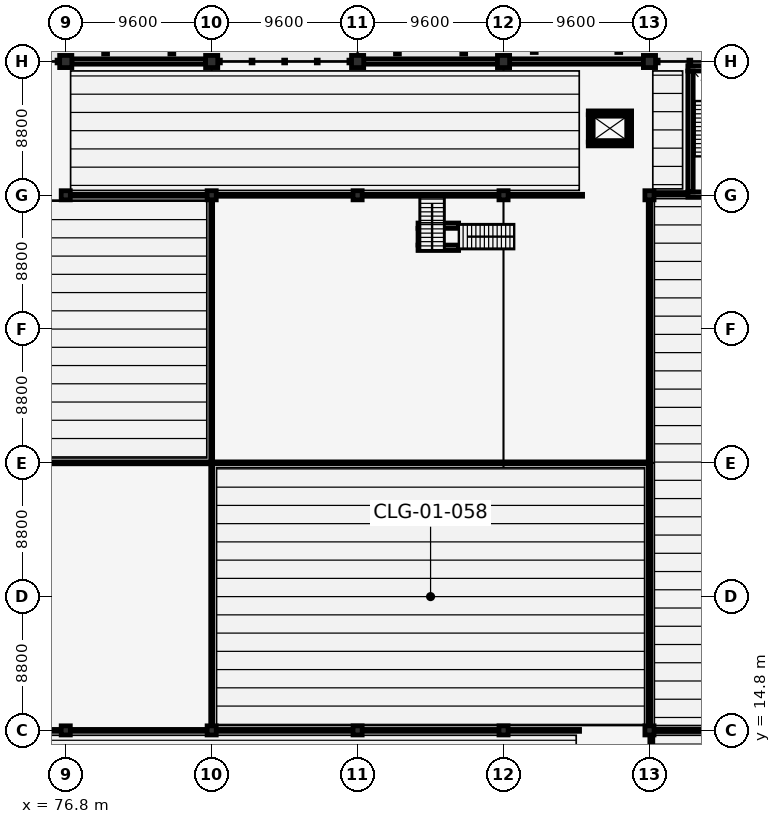
"""IFC4 building model, lengths in metres.
Left out: names, types, materials, properties, quantities, classifications, styles, units other than length and angle.
Written with IfcOpenShell. Run it as: python <this file> out.ifc"""

import sys

from ifc_helpers import new_model, si_unit, direction, frame, frame_2d, origin, origin_2d, place, context, subcontext, project, spatial, rectangle, hollow_rectangle, extrude, element, fill, save


model = new_model("IFC4")
c1 = context("Model", 3, precision=1e-05, world=origin(), true_north=direction((0.0, 1.0)))
c2 = subcontext(c1, "Body", "Model", "MODEL_VIEW")
j1 = project(units=[si_unit("LENGTHUNIT", "METRE"), si_unit("PLANEANGLEUNIT", "RADIAN")], contexts=[c1])
p1 = place(None, origin())
s1 = spatial("IfcSite", under=j1, at=p1, CompositionType="ELEMENT")
p2 = place(p1, origin())
s2 = spatial("IfcBuilding", under=s1, at=p2, CompositionType="ELEMENT")
p3 = place(p2, origin())
s3 = spatial("IfcBuildingStorey", under=s2, at=p3, CompositionType="ELEMENT", Elevation=0.0)
for number, where, z_axis, x_axis in (
    (1, (76.8, 14.8, 0.0), (0.0, 0.0, 1.0), (1.0, 0.0, 0.0)),
    (2, (76.8, 50.0, 0.0), (0.0, 0.0, 1.0), (1.0, 0.0, 0.0)),
):
    element("IfcColumn", number, at=place(p3, frame(where, z_axis=z_axis, x_axis=x_axis)), inside=s3, PredefinedType="COLUMN", context=c2, shape_type="SweptSolid", body=[
        extrude(rectangle(XDim=0.6, YDim=0.6, at=origin_2d()), origin(), (0.0, 0.0, 1.0), 4.8),
    ])
p4 = place(p3, frame((76.8, 58.8, 0.0), z_axis=(0.0, 0.0, 1.0), x_axis=(1.0, 0.0, 0.0)))
e3 = element("IfcColumn", 3, at=p4, inside=s3, PredefinedType="COLUMN", context=c2, shape_type="SweptSolid", body=[
    extrude(rectangle(XDim=0.8, YDim=0.8, at=origin_2d()), origin(), (0.0, 0.0, 1.0), 4.8),
])
for number, where, z_axis, x_axis in (
    (4, (86.4, 14.8, 0.0), (0.0, 0.0, 1.0), (1.0, 0.0, 0.0)),
    (5, (86.4, 50.0, 0.0), (0.0, 0.0, 1.0), (1.0, 0.0, 0.0)),
):
    element("IfcColumn", number, at=place(p3, frame(where, z_axis=z_axis, x_axis=x_axis)), inside=s3, PredefinedType="COLUMN", context=c2, shape_type="SweptSolid", body=[
        extrude(rectangle(XDim=0.6, YDim=0.6, at=origin_2d()), origin(), (0.0, 0.0, 1.0), 4.8),
    ])
p5 = place(p3, frame((86.4, 58.8, 0.0), z_axis=(0.0, 0.0, 1.0), x_axis=(1.0, 0.0, 0.0)))
e6 = element("IfcColumn", 6, at=p5, inside=s3, PredefinedType="COLUMN", context=c2, shape_type="SweptSolid", body=[
    extrude(rectangle(XDim=0.8, YDim=0.8, at=origin_2d()), origin(), (0.0, 0.0, 1.0), 4.8),
])
for number, where, z_axis, x_axis in (
    (7, (96.0, 14.8, 0.0), (0.0, 0.0, 1.0), (1.0, 0.0, 0.0)),
    (8, (96.0, 50.0, 0.0), (0.0, 0.0, 1.0), (1.0, 0.0, 0.0)),
):
    element("IfcColumn", number, at=place(p3, frame(where, z_axis=z_axis, x_axis=x_axis)), inside=s3, PredefinedType="COLUMN", context=c2, shape_type="SweptSolid", body=[
        extrude(rectangle(XDim=0.6, YDim=0.6, at=origin_2d()), origin(), (0.0, 0.0, 1.0), 4.8),
    ])
p6 = place(p3, frame((96.0, 58.8, 0.0), z_axis=(0.0, 0.0, 1.0), x_axis=(1.0, 0.0, 0.0)))
e9 = element("IfcColumn", 9, at=p6, inside=s3, PredefinedType="COLUMN", context=c2, shape_type="SweptSolid", body=[
    extrude(rectangle(XDim=0.8, YDim=0.8, at=origin_2d()), origin(), (0.0, 0.0, 1.0), 4.8),
])
for number, where, z_axis, x_axis in (
    (10, (105.6, 14.8, 0.0), (0.0, 0.0, 1.0), (1.0, 0.0, 0.0)),
    (11, (105.6, 50.0, 0.0), (0.0, 0.0, 1.0), (1.0, 0.0, 0.0)),
):
    element("IfcColumn", number, at=place(p3, frame(where, z_axis=z_axis, x_axis=x_axis)), inside=s3, PredefinedType="COLUMN", context=c2, shape_type="SweptSolid", body=[
        extrude(rectangle(XDim=0.6, YDim=0.6, at=origin_2d()), origin(), (0.0, 0.0, 1.0), 4.8),
    ])
p7 = place(p3, frame((105.6, 58.8, 0.0), z_axis=(0.0, 0.0, 1.0), x_axis=(1.0, 0.0, 0.0)))
e12 = element("IfcColumn", 12, at=p7, inside=s3, PredefinedType="COLUMN", context=c2, shape_type="SweptSolid", body=[
    extrude(rectangle(XDim=0.8, YDim=0.8, at=origin_2d()), origin(), (0.0, 0.0, 1.0), 4.8),
])
for number, where, z_axis, x_axis in (
    (13, (115.2, 14.8, 0.0), (0.0, 0.0, 1.0), (1.0, 0.0, 0.0)),
    (14, (115.2, 50.0, 0.0), (0.0, 0.0, 1.0), (1.0, 0.0, 0.0)),
):
    element("IfcColumn", number, at=place(p3, frame(where, z_axis=z_axis, x_axis=x_axis)), inside=s3, PredefinedType="COLUMN", context=c2, shape_type="SweptSolid", body=[
        extrude(rectangle(XDim=0.6, YDim=0.6, at=origin_2d()), origin(), (0.0, 0.0, 1.0), 4.8),
    ])
p8 = place(p3, frame((115.2, 58.8, 0.0), z_axis=(0.0, 0.0, 1.0), x_axis=(1.0, 0.0, 0.0)))
e15 = element("IfcColumn", 15, at=p8, inside=s3, PredefinedType="COLUMN", context=c2, shape_type="SweptSolid", body=[
    extrude(rectangle(XDim=0.8, YDim=0.8, at=origin_2d()), origin(), (0.0, 0.0, 1.0), 4.8),
])
p9 = place(p3, frame((77.2, 58.8, 0.0), z_axis=(0.0, 0.0, 1.0), x_axis=(1.0, 0.0, 0.0)))
e16 = element("IfcWall", 16, at=p9, inside=s3, PredefinedType="SOLIDWALL", context=c2, shape_type="SweptSolid", body=[
    extrude(rectangle(XDim=8.8, YDim=0.35, at=frame_2d((4.4, 0.0))), origin(), (0.0, 0.0, 1.0), 4.1),
])
p10 = place(p9, frame((1.4, 0.0, 0.0)))
e17 = element("IfcOpeningElement", 17, at=p10, cuts=e16, PredefinedType="OPENING", context=c2, shape_type="SweptSolid", body=[
    extrude(rectangle(XDim=1.96, YDim=2.37, at=frame_2d((0.98, 1.185))), frame((0.0, 0.185, 0.0), z_axis=(0.0, -1.0, 0.0), x_axis=(1.0, 0.0, 0.0)), (0.0, 0.0, 1.0), 0.37),
])
p11 = place(p9, frame((4.8, 0.0, 0.0)))
e18 = element("IfcOpeningElement", 18, at=p11, cuts=e16, PredefinedType="OPENING", context=c2, shape_type="SweptSolid", body=[
    extrude(rectangle(XDim=1.72, YDim=2.34, at=frame_2d((0.86, 1.17))), frame((0.0, 0.185, 0.0), z_axis=(0.0, -1.0, 0.0), x_axis=(1.0, 0.0, 0.0)), (0.0, 0.0, 1.0), 0.37),
])
p12 = place(p3, frame((96.4, 58.8, 0.0), z_axis=(0.0, 0.0, 1.0), x_axis=(1.0, 0.0, 0.0)))
e19 = element("IfcWall", 19, at=p12, inside=s3, PredefinedType="SOLIDWALL", context=c2, shape_type="SweptSolid", body=[
    extrude(rectangle(XDim=8.8, YDim=0.35, at=frame_2d((4.4, 0.0))), origin(), (0.0, 0.0, 1.0), 4.1),
])
p13 = place(p12, frame((1.4, 0.0, 0.0)))
e20 = element("IfcOpeningElement", 20, at=p13, cuts=e19, PredefinedType="OPENING", context=c2, shape_type="SweptSolid", body=[
    extrude(rectangle(XDim=1.96, YDim=2.37, at=frame_2d((0.98, 1.185))), frame((0.0, 0.185, 0.0), z_axis=(0.0, -1.0, 0.0), x_axis=(1.0, 0.0, 0.0)), (0.0, 0.0, 1.0), 0.37),
])
p14 = place(p12, frame((4.8, 0.0, 0.0)))
e21 = element("IfcOpeningElement", 21, at=p14, cuts=e19, PredefinedType="OPENING", context=c2, shape_type="SweptSolid", body=[
    extrude(rectangle(XDim=1.72, YDim=2.34, at=frame_2d((0.86, 1.17))), frame((0.0, 0.185, 0.0), z_axis=(0.0, -1.0, 0.0), x_axis=(1.0, 0.0, 0.0)), (0.0, 0.0, 1.0), 0.37),
])
p15 = place(p3, frame((106.0, 58.8, 0.0), z_axis=(0.0, 0.0, 1.0), x_axis=(1.0, 0.0, 0.0)))
e22 = element("IfcWall", 22, at=p15, inside=s3, PredefinedType="SOLIDWALL", context=c2, shape_type="SweptSolid", body=[
    extrude(rectangle(XDim=8.8, YDim=0.35, at=frame_2d((4.4, 0.0))), origin(), (0.0, 0.0, 1.0), 4.1),
])
p16 = place(p15, frame((1.4, 0.0, 0.0)))
e23 = element("IfcOpeningElement", 23, at=p16, cuts=e22, PredefinedType="OPENING", context=c2, shape_type="SweptSolid", body=[
    extrude(rectangle(XDim=1.88, YDim=2.31, at=frame_2d((0.94, 1.155))), frame((0.0, 0.185, 0.0), z_axis=(0.0, -1.0, 0.0), x_axis=(1.0, 0.0, 0.0)), (0.0, 0.0, 1.0), 0.37),
])
p17 = place(p15, frame((4.8, 0.0, 0.0)))
e24 = element("IfcOpeningElement", 24, at=p17, cuts=e22, PredefinedType="OPENING", context=c2, shape_type="SweptSolid", body=[
    extrude(rectangle(XDim=1.8, YDim=2.4, at=frame_2d((0.9, 1.2))), frame((0.0, 0.185, 0.0), z_axis=(0.0, -1.0, 0.0), x_axis=(1.0, 0.0, 0.0)), (0.0, 0.0, 1.0), 0.37),
])
for number, where, z_axis, x_axis in (
    (25, (79.42, 59.42, 0.0), (0.0, 0.0, 1.0), (1.0, 0.0, 0.0)),
    (26, (83.78, 59.42, 0.0), (0.0, 0.0, 1.0), (1.0, 0.0, 0.0)),
    (27, (98.62, 59.42, 0.0), (0.0, 0.0, 1.0), (1.0, 0.0, 0.0)),
    (28, (102.98, 59.42, 0.0), (0.0, 0.0, 1.0), (1.0, 0.0, 0.0)),
):
    element("IfcColumn", number, at=place(p3, frame(where, z_axis=z_axis, x_axis=x_axis)), inside=s3, PredefinedType="COLUMN", context=c2, shape_type="SweptSolid", body=[
        extrude(hollow_rectangle(XDim=0.254, YDim=0.254, WallThickness=0.012, at=origin_2d()), origin(), (0.0, 0.0, 1.0), 3.47),
    ])
for number, where, z_axis, x_axis in (
    (29, (107.62, 59.52, 0.0), (0.0, 0.0, 1.0), (1.0, 0.0, 0.0)),
    (30, (113.18, 59.52, 0.0), (0.0, 0.0, 1.0), (1.0, 0.0, 0.0)),
):
    element("IfcColumn", number, at=place(p3, frame(where, z_axis=z_axis, x_axis=x_axis)), inside=s3, PredefinedType="COLUMN", context=c2, shape_type="SweptSolid", body=[
        extrude(hollow_rectangle(XDim=0.254, YDim=0.254, WallThickness=0.012, at=origin_2d()), origin(), (0.0, 0.0, 1.0), 3.56),
    ])
for number, where, z_axis, x_axis in (
    (31, (123.375, 50.05, 0.0), (0.0, 0.0, 1.0), (-1.0, 0.0, 0.0)),
    (32, (117.725, 58.35, 0.0), (0.0, 0.0, 1.0), (1.0, 0.0, 0.0)),
):
    element("IfcWall", number, at=place(p3, frame(where, z_axis=z_axis, x_axis=x_axis)), inside=s3, PredefinedType="SHEAR", context=c2, shape_type="SweptSolid", body=[
        extrude(rectangle(XDim=5.65, YDim=0.35, at=frame_2d((2.825, 0.0))), origin(), (0.0, 0.0, 1.0), 4.55),
    ])
p18 = place(p3, frame((117.9, 50.225, 0.0), z_axis=(0.0, 0.0, 1.0), x_axis=(0.0, 1.0, 0.0)))
e33 = element("IfcWall", 33, at=p18, inside=s3, PredefinedType="SHEAR", context=c2, shape_type="SweptSolid", body=[
    extrude(rectangle(XDim=7.95, YDim=0.35, at=frame_2d((3.975, 0.0))), origin(), (0.0, 0.0, 1.0), 4.55),
])
p19 = place(p18, frame((0.22, 0.0, 0.0)))
e34 = element("IfcOpeningElement", 34, at=p19, cuts=e33, PredefinedType="OPENING", context=c2, shape_type="SweptSolid", body=[
    extrude(rectangle(XDim=2.05, YDim=2.15, at=frame_2d((1.025, 1.075))), frame((0.0, 0.185, 0.0), z_axis=(0.0, -1.0, 0.0), x_axis=(1.0, 0.0, 0.0)), (0.0, 0.0, 1.0), 0.37),
])
for number, where, z_axis, x_axis in (
    (35, (99.975, 46.55, 0.0), (0.0, 0.0, 1.0), (1.0, 0.0, 0.0)),
    (36, (99.975, 48.0, 0.0), (0.0, 0.0, 1.0), (1.0, 0.0, 0.0)),
):
    element("IfcWall", number, at=place(p3, frame(where, z_axis=z_axis, x_axis=x_axis)), inside=s3, PredefinedType="SHEAR", context=c2, shape_type="SweptSolid", body=[
        extrude(rectangle(XDim=2.67, YDim=0.35, at=frame_2d((1.335, 0.0))), origin(), (0.0, 0.0, 1.0), 2.205),
    ])
p20 = place(p3, frame((100.15, 46.725, 0.0), z_axis=(0.0, 0.0, 1.0), x_axis=(0.0, 1.0, 0.0)))
e37 = element("IfcWall", 37, at=p20, inside=s3, PredefinedType="SHEAR", context=c2, shape_type="SweptSolid", body=[
    extrude(rectangle(XDim=1.1, YDim=0.35, at=frame_2d((0.55, 0.0))), origin(), (0.0, 0.0, 1.0), 2.205),
])
p21 = place(p3, frame((114.025, 53.375, 0.0), z_axis=(0.0, 0.0, 1.0), x_axis=(-1.0, 0.0, 0.0)))
e38 = element("IfcWall", 38, at=p21, inside=s3, PredefinedType="SOLIDWALL", context=c2, shape_type="SweptSolid", body=[
    extrude(rectangle(XDim=2.85, YDim=0.25, at=frame_2d((1.425, 0.0))), origin(), (0.0, 0.0, 1.0), 4.55),
])
p22 = place(p21, frame((0.875, 0.0, 0.0)))
e39 = element("IfcOpeningElement", 39, at=p22, cuts=e38, PredefinedType="OPENING", context=c2, shape_type="SweptSolid", body=[
    extrude(rectangle(XDim=1.1, YDim=2.15, at=frame_2d((0.55, 1.075))), frame((0.0, 0.135, 0.0), z_axis=(0.0, -1.0, 0.0), x_axis=(1.0, 0.0, 0.0)), (0.0, 0.0, 1.0), 0.27),
])
p23 = place(p3, frame((111.175, 55.425, 0.0), z_axis=(0.0, 0.0, 1.0), x_axis=(1.0, 0.0, 0.0)))
e40 = element("IfcWall", 40, at=p23, inside=s3, PredefinedType="SOLIDWALL", context=c2, shape_type="SweptSolid", body=[
    extrude(rectangle(XDim=2.85, YDim=0.25, at=frame_2d((1.425, 0.0))), origin(), (0.0, 0.0, 1.0), 4.55),
])
for number, where, z_axis, x_axis in (
    (41, (111.3, 53.5, 0.0), (0.0, 0.0, 1.0), (0.0, 1.0, 0.0)),
    (42, (113.9, 55.3, 0.0), (0.0, 0.0, 1.0), (0.0, -1.0, 0.0)),
):
    element("IfcWall", number, at=place(p3, frame(where, z_axis=z_axis, x_axis=x_axis)), inside=s3, PredefinedType="SOLIDWALL", context=c2, shape_type="SweptSolid", body=[
        extrude(rectangle(XDim=1.8, YDim=0.25, at=frame_2d((0.9, 0.0))), origin(), (0.0, 0.0, 1.0), 4.55),
    ])
p24 = place(p3, frame((86.4, 14.9, 0.0), z_axis=(0.0, 0.0, 1.0), x_axis=(0.0, 1.0, 0.0)))
e43 = element("IfcWall", 43, at=p24, inside=s3, PredefinedType="PARTITIONING", context=c2, shape_type="SweptSolid", body=[
    extrude(rectangle(XDim=17.4, YDim=0.125, at=frame_2d((8.7, 0.0))), origin(), (0.0, 0.0, 1.0), 4.42),
])
p25 = place(p3, frame((57.7, 32.4, 0.0), z_axis=(0.0, 0.0, 1.0), x_axis=(1.0, 0.0, 0.0)))
e44 = element("IfcWall", 44, at=p25, inside=s3, PredefinedType="PARTITIONING", context=c2, shape_type="SweptSolid", body=[
    extrude(rectangle(XDim=28.6, YDim=0.125, at=frame_2d((14.3, 0.0))), origin(), (0.0, 0.0, 1.0), 4.42),
])
p26 = place(p3, frame((62.2, 14.8, 0.0), z_axis=(0.0, 0.0, 1.0), x_axis=(1.0, 0.0, 0.0)))
e45 = element("IfcWall", 45, at=p26, inside=s3, PredefinedType="PARTITIONING", context=c2, shape_type="SweptSolid", body=[
    extrude(rectangle(XDim=24.1, YDim=0.125, at=frame_2d((12.05, 0.0))), origin(), (0.0, 0.0, 1.0), 3.925),
])
p27 = place(p3, frame((86.5, 32.4, 0.0), z_axis=(0.0, 0.0, 1.0), x_axis=(1.0, 0.0, 0.0)))
e46 = element("IfcWall", 46, at=p27, inside=s3, PredefinedType="PARTITIONING", context=c2, shape_type="SweptSolid", body=[
    extrude(rectangle(XDim=28.65, YDim=0.125, at=frame_2d((14.325, 0.0))), origin(), (0.0, 0.0, 1.0), 4.42),
])
p28 = place(p3, frame((86.5, 14.8, 0.0), z_axis=(0.0, 0.0, 1.0), x_axis=(1.0, 0.0, 0.0)))
e47 = element("IfcWall", 47, at=p28, inside=s3, PredefinedType="PARTITIONING", context=c2, shape_type="SweptSolid", body=[
    extrude(rectangle(XDim=24.1, YDim=0.125, at=frame_2d((12.05, 0.0))), origin(), (0.0, 0.0, 1.0), 3.925),
])
p29 = place(p3, frame((115.2, 14.9, 0.0), z_axis=(0.0, 0.0, 1.0), x_axis=(0.0, 1.0, 0.0)))
e48 = element("IfcWall", 48, at=p29, inside=s3, PredefinedType="PARTITIONING", context=c2, shape_type="SweptSolid", body=[
    extrude(rectangle(XDim=17.4, YDim=0.16, at=frame_2d((8.7, 0.0))), origin(), (0.0, 0.0, 1.0), 4.42),
])
p30 = place(p29, frame((7.8, 0.0, 0.0)))
e49 = element("IfcOpeningElement", 49, at=p30, cuts=e48, PredefinedType="OPENING", context=c2, shape_type="SweptSolid", body=[
    extrude(rectangle(XDim=1.8, YDim=2.15, at=frame_2d((0.9, 1.075))), frame((0.0, 0.09, 0.0), z_axis=(0.0, -1.0, 0.0), x_axis=(1.0, 0.0, 0.0)), (0.0, 0.0, 1.0), 0.18),
])
p31 = place(p3, frame((86.4, 32.5, 0.0), z_axis=(0.0, 0.0, 1.0), x_axis=(0.0, 1.0, 0.0)))
e50 = element("IfcWall", 50, at=p31, inside=s3, PredefinedType="PARTITIONING", context=c2, shape_type="SweptSolid", body=[
    extrude(rectangle(XDim=17.45, YDim=0.125, at=frame_2d((8.725, 0.0))), origin(), (0.0, 0.0, 1.0), 4.42),
])
p32 = place(p3, frame((76.9, 50.0, 0.0), z_axis=(0.0, 0.0, 1.0), x_axis=(1.0, 0.0, 0.0)))
e51 = element("IfcWall", 51, at=p32, inside=s3, PredefinedType="PARTITIONING", context=c2, shape_type="SweptSolid", body=[
    extrude(rectangle(XDim=9.4, YDim=0.125, at=frame_2d((4.7, 0.0))), origin(), (0.0, 0.0, 1.0), 3.925),
])
p33 = place(p3, frame((86.5, 50.0, 0.0), z_axis=(0.0, 0.0, 1.0), x_axis=(1.0, 0.0, 0.0)))
e52 = element("IfcWall", 52, at=p33, inside=s3, PredefinedType="PARTITIONING", context=c2, shape_type="SweptSolid", body=[
    extrude(rectangle(XDim=24.3, YDim=0.125, at=frame_2d((12.15, 0.0))), origin(), (0.0, 0.0, 1.0), 3.925),
])
p34 = place(p3, frame((115.2, 32.5, 0.0), z_axis=(0.0, 0.0, 1.0), x_axis=(0.0, 1.0, 0.0)))
e53 = element("IfcWall", 53, at=p34, inside=s3, PredefinedType="PARTITIONING", context=c2, shape_type="SweptSolid", body=[
    extrude(rectangle(XDim=17.45, YDim=0.16, at=frame_2d((8.725, 0.0))), origin(), (0.0, 0.0, 1.0), 4.42),
])
p35 = place(p34, frame((7.825, 0.0, 0.0)))
e54 = element("IfcOpeningElement", 54, at=p35, cuts=e53, PredefinedType="OPENING", context=c2, shape_type="SweptSolid", body=[
    extrude(rectangle(XDim=1.8, YDim=2.15, at=frame_2d((0.9, 1.075))), frame((0.0, 0.09, 0.0), z_axis=(0.0, -1.0, 0.0), x_axis=(1.0, 0.0, 0.0)), (0.0, 0.0, 1.0), 0.18),
])
p36 = place(p3, frame((115.15, 50.1, 0.0), z_axis=(0.0, 0.0, 1.0), x_axis=(1.0, 0.0, 0.0)))
e55 = element("IfcWall", 55, at=p36, inside=s3, PredefinedType="PARTITIONING", context=c2, shape_type="SweptSolid", body=[
    extrude(rectangle(XDim=2.45, YDim=0.16, at=frame_2d((1.225, 0.0))), origin(), (0.0, 0.0, 1.0), 3.835),
])
p37 = place(p36, frame((0.43, 0.0, 0.0)))
e56 = element("IfcOpeningElement", 56, at=p37, cuts=e55, PredefinedType="OPENING", context=c2, shape_type="SweptSolid", body=[
    extrude(rectangle(XDim=1.8, YDim=2.15, at=frame_2d((0.9, 1.075))), frame((0.0, 0.09, 0.0), z_axis=(0.0, -1.0, 0.0), x_axis=(1.0, 0.0, 0.0)), (0.0, 0.0, 1.0), 0.18),
])
p38 = place(p3, frame((115.15, 14.8, 0.0), z_axis=(0.0, 0.0, 1.0), x_axis=(1.0, 0.0, 0.0)))
e57 = element("IfcWall", 57, at=p38, inside=s3, PredefinedType="PARTITIONING", context=c2, shape_type="SweptSolid", body=[
    extrude(rectangle(XDim=4.65, YDim=0.15, at=frame_2d((2.325, 0.0))), origin(), (0.0, 0.0, 1.0), 3.835),
])
p39 = place(p38, frame((1.85, 0.0, 0.0)))
e58 = element("IfcOpeningElement", 58, at=p39, cuts=e57, PredefinedType="OPENING", context=c2, shape_type="SweptSolid", body=[
    extrude(rectangle(XDim=0.95, YDim=2.15, at=frame_2d((0.475, 1.075))), frame((0.0, 0.085, 0.0), z_axis=(0.0, -1.0, 0.0), x_axis=(1.0, 0.0, 0.0)), (0.0, 0.0, 1.0), 0.17),
])
p40 = place(p3, frame((115.3, 10.84, 0.0), z_axis=(0.0, 0.0, 1.0), x_axis=(0.0, 1.0, 0.0)))
e59 = element("IfcWall", 59, at=p40, inside=s3, PredefinedType="PARTITIONING", context=c2, shape_type="SweptSolid", body=[
    extrude(rectangle(XDim=3.72, YDim=0.15, at=frame_2d((1.86, 0.0))), origin(), (0.0, 0.0, 1.0), 4.067),
])
p41 = place(p10, origin())
e60 = element("IfcDoor", 60, at=p41, inside=s3, OperationType="DOUBLE_DOOR_SINGLE_SWING", PredefinedType="DOOR", context=c2, shape_type="SweptSolid", body=[
    extrude(rectangle(XDim=1.96, YDim=2.37, at=frame_2d((0.98, 1.185))), frame((0.0, 0.025, 0.0), z_axis=(0.0, -1.0, 0.0), x_axis=(1.0, 0.0, 0.0)), (0.0, 0.0, 1.0), 0.05),
])
fill(e17, e60)
p42 = place(p11, origin())
e61 = element("IfcDoor", 61, at=p42, inside=s3, OperationType="DOUBLE_DOOR_SINGLE_SWING", PredefinedType="DOOR", context=c2, shape_type="SweptSolid", body=[
    extrude(rectangle(XDim=1.72, YDim=2.34, at=frame_2d((0.86, 1.17))), frame((0.0, 0.025, 0.0), z_axis=(0.0, -1.0, 0.0), x_axis=(1.0, 0.0, 0.0)), (0.0, 0.0, 1.0), 0.05),
])
fill(e18, e61)
p43 = place(p13, origin())
e62 = element("IfcDoor", 62, at=p43, inside=s3, OperationType="DOUBLE_DOOR_SINGLE_SWING", PredefinedType="DOOR", context=c2, shape_type="SweptSolid", body=[
    extrude(rectangle(XDim=1.96, YDim=2.37, at=frame_2d((0.98, 1.185))), frame((0.0, 0.025, 0.0), z_axis=(0.0, -1.0, 0.0), x_axis=(1.0, 0.0, 0.0)), (0.0, 0.0, 1.0), 0.05),
])
fill(e20, e62)
p44 = place(p14, origin())
e63 = element("IfcDoor", 63, at=p44, inside=s3, OperationType="DOUBLE_DOOR_SINGLE_SWING", PredefinedType="DOOR", context=c2, shape_type="SweptSolid", body=[
    extrude(rectangle(XDim=1.72, YDim=2.34, at=frame_2d((0.86, 1.17))), frame((0.0, 0.025, 0.0), z_axis=(0.0, -1.0, 0.0), x_axis=(1.0, 0.0, 0.0)), (0.0, 0.0, 1.0), 0.05),
])
fill(e21, e63)
p45 = place(p16, origin())
e64 = element("IfcDoor", 64, at=p45, inside=s3, OperationType="DOUBLE_DOOR_SINGLE_SWING", PredefinedType="DOOR", context=c2, shape_type="SweptSolid", body=[
    extrude(rectangle(XDim=1.88, YDim=2.31, at=frame_2d((0.94, 1.155))), frame((0.0, 0.025, 0.0), z_axis=(0.0, -1.0, 0.0), x_axis=(1.0, 0.0, 0.0)), (0.0, 0.0, 1.0), 0.05),
])
fill(e23, e64)
p46 = place(p17, origin())
e65 = element("IfcDoor", 65, at=p46, inside=s3, OperationType="DOUBLE_DOOR_SINGLE_SWING", PredefinedType="DOOR", context=c2, shape_type="SweptSolid", body=[
    extrude(rectangle(XDim=1.8, YDim=2.4, at=frame_2d((0.9, 1.2))), frame((0.0, 0.025, 0.0), z_axis=(0.0, -1.0, 0.0), x_axis=(1.0, 0.0, 0.0)), (0.0, 0.0, 1.0), 0.05),
])
fill(e24, e65)
p47 = place(p19, origin())
e66 = element("IfcDoor", 66, at=p47, inside=s3, OperationType="DOUBLE_DOOR_SINGLE_SWING", PredefinedType="DOOR", context=c2, shape_type="SweptSolid", body=[
    extrude(rectangle(XDim=2.05, YDim=2.15, at=frame_2d((1.025, 1.075))), frame((0.0, 0.025, 0.0), z_axis=(0.0, -1.0, 0.0), x_axis=(1.0, 0.0, 0.0)), (0.0, 0.0, 1.0), 0.05),
])
fill(e34, e66)
p48 = place(p22, origin())
e67 = element("IfcDoor", 67, at=p48, inside=s3, OperationType="DOUBLE_DOOR_SLIDING", PredefinedType="DOOR", context=c2, shape_type="SweptSolid", body=[
    extrude(rectangle(XDim=1.1, YDim=2.15, at=frame_2d((0.55, 1.075))), frame((0.0, 0.025, 0.0), z_axis=(0.0, -1.0, 0.0), x_axis=(1.0, 0.0, 0.0)), (0.0, 0.0, 1.0), 0.05),
])
fill(e39, e67)
p49 = place(p30, origin())
e68 = element("IfcDoor", 68, at=p49, inside=s3, OperationType="DOUBLE_DOOR_SINGLE_SWING", PredefinedType="DOOR", context=c2, shape_type="SweptSolid", body=[
    extrude(rectangle(XDim=1.8, YDim=2.15, at=frame_2d((0.9, 1.075))), frame((0.0, 0.025, 0.0), z_axis=(0.0, -1.0, 0.0), x_axis=(1.0, 0.0, 0.0)), (0.0, 0.0, 1.0), 0.05),
])
fill(e49, e68)
p50 = place(p35, origin())
e69 = element("IfcDoor", 69, at=p50, inside=s3, OperationType="DOUBLE_DOOR_SINGLE_SWING", PredefinedType="DOOR", context=c2, shape_type="SweptSolid", body=[
    extrude(rectangle(XDim=1.8, YDim=2.15, at=frame_2d((0.9, 1.075))), frame((0.0, 0.025, 0.0), z_axis=(0.0, -1.0, 0.0), x_axis=(1.0, 0.0, 0.0)), (0.0, 0.0, 1.0), 0.05),
])
fill(e54, e69)
p51 = place(p37, origin())
e70 = element("IfcDoor", 70, at=p51, inside=s3, OperationType="DOUBLE_DOOR_SINGLE_SWING", PredefinedType="DOOR", context=c2, shape_type="SweptSolid", body=[
    extrude(rectangle(XDim=1.8, YDim=2.15, at=frame_2d((0.9, 1.075))), frame((0.0, 0.025, 0.0), z_axis=(0.0, -1.0, 0.0), x_axis=(1.0, 0.0, 0.0)), (0.0, 0.0, 1.0), 0.05),
])
fill(e56, e70)
p52 = place(p39, origin())
e71 = element("IfcDoor", 71, at=p52, inside=s3, OperationType="SINGLE_SWING_LEFT", PredefinedType="DOOR", context=c2, shape_type="SweptSolid", body=[
    extrude(rectangle(XDim=0.95, YDim=2.15, at=frame_2d((0.475, 1.075))), frame((0.0, 0.025, 0.0), z_axis=(0.0, -1.0, 0.0), x_axis=(1.0, 0.0, 0.0)), (0.0, 0.0, 1.0), 0.05),
])
fill(e58, e71)
save(model, sys.argv[1])
